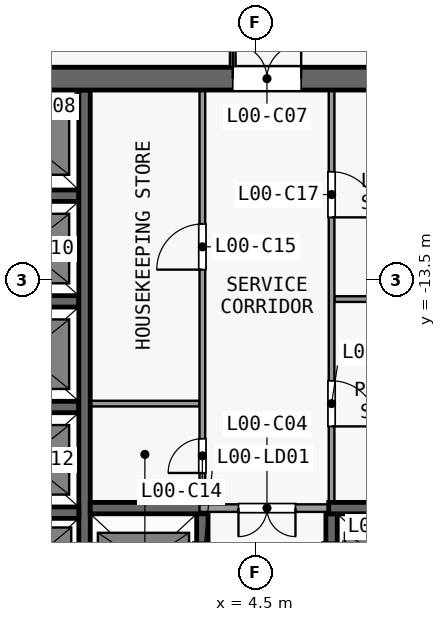
"""IFC4 building model, lengths in metres.
Left out: names, types, materials, properties, quantities, classifications, styles, units other than length and angle.
Written with IfcOpenShell. Run it as: python <this file> out.ifc"""

import sys

from ifc_helpers import new_model, si_unit, direction, frame, frame_2d, origin, place, context, subcontext, project, spatial, rectangle, extrude, element, fill, save


model = new_model("IFC4")
c1 = context("Model", 3, precision=1e-05, world=origin(), true_north=direction((0.0, 1.0)))
c2 = subcontext(c1, "Body", "Model", "MODEL_VIEW")
j1 = project(units=[si_unit("LENGTHUNIT", "METRE"), si_unit("PLANEANGLEUNIT", "RADIAN")], contexts=[c1])
p1 = place(None, origin())
s1 = spatial("IfcSite", under=j1, at=p1, CompositionType="ELEMENT")
p2 = place(p1, origin())
s2 = spatial("IfcBuilding", under=s1, at=p2, CompositionType="ELEMENT")
p3 = place(p2, origin())
s3 = spatial("IfcBuildingStorey", under=s2, at=p3, CompositionType="ELEMENT", Elevation=0.0)
p4 = place(p3, frame((-13.5, -8.2, 0.0), z_axis=(0.0, 0.0, 1.0), x_axis=(1.0, 0.0, 0.0)))
e1 = element("IfcWall", 1, at=p4, inside=s3, PredefinedType="SHEAR", context=c2, shape_type="SweptSolid", body=[
    extrude(rectangle(XDim=27.0, YDim=0.6, at=frame_2d((13.5, 0.0))), origin(), (0.0, 0.0, 1.0), 7.65),
])
p5 = place(p4, frame((7.8, 0.0, 0.0)))
e2 = element("IfcOpeningElement", 2, at=p5, cuts=e1, PredefinedType="OPENING", context=c2, shape_type="SweptSolid", body=[
    extrude(rectangle(XDim=1.8, YDim=2.1, at=frame_2d((0.9, 1.05))), frame((0.0, 0.31, 0.0), z_axis=(0.0, -1.0, 0.0), x_axis=(1.0, 0.0, 0.0)), (0.0, 0.0, 1.0), 0.62),
])
p6 = place(p4, frame((17.4, 0.0, 0.0)))
e3 = element("IfcOpeningElement", 3, at=p6, cuts=e1, PredefinedType="OPENING", context=c2, shape_type="SweptSolid", body=[
    extrude(rectangle(XDim=1.8, YDim=2.1, at=frame_2d((0.9, 1.05))), frame((0.0, 0.31, 0.0), z_axis=(0.0, -1.0, 0.0), x_axis=(1.0, 0.0, 0.0)), (0.0, 0.0, 1.0), 0.62),
])
p7 = place(p4, frame((2.725, 0.0, 0.0)))
e4 = element("IfcOpeningElement", 4, at=p7, cuts=e1, PredefinedType="OPENING", context=c2, shape_type="SweptSolid", body=[
    extrude(rectangle(XDim=0.9, YDim=2.1, at=frame_2d((0.45, 1.05))), frame((0.0, 0.31, 0.0), z_axis=(0.0, -1.0, 0.0), x_axis=(1.0, 0.0, 0.0)), (0.0, 0.0, 1.0), 0.62),
])
p8 = place(p4, frame((24.075, 0.0, 0.0)))
e5 = element("IfcOpeningElement", 5, at=p8, cuts=e1, PredefinedType="OPENING", context=c2, shape_type="SweptSolid", body=[
    extrude(rectangle(XDim=1.2, YDim=2.1, at=frame_2d((0.6, 1.05))), frame((0.0, 0.31, 0.0), z_axis=(0.0, -1.0, 0.0), x_axis=(1.0, 0.0, 0.0)), (0.0, 0.0, 1.0), 0.62),
])
p9 = place(p3, frame((-2.95, -19.62, 0.0), z_axis=(0.0, 0.0, 1.0), x_axis=(1.0, 0.0, 0.0)))
e6 = element("IfcWall", 6, at=p9, inside=s3, PredefinedType="SHEAR", context=c2, shape_type="SweptSolid", body=[
    extrude(rectangle(XDim=2.8, YDim=0.3, at=frame_2d((1.4, 0.0))), origin(), (0.0, 0.0, 1.0), 7.65),
])
p10 = place(p3, frame((0.15, -19.5, 0.0), z_axis=(0.0, 0.0, 1.0), x_axis=(1.0, 0.0, 0.0)))
e7 = element("IfcWall", 7, at=p10, inside=s3, PredefinedType="SHEAR", context=c2, shape_type="SweptSolid", body=[
    extrude(rectangle(XDim=3.025, YDim=0.3, at=frame_2d((1.513, 0.0))), origin(), (0.0, 0.0, 1.0), 7.65),
])
p11 = place(p3, frame((6.575, -19.5, 0.0), z_axis=(0.0, 0.0, 1.0), x_axis=(-1.0, 0.0, 0.0)))
e8 = element("IfcWall", 8, at=p11, inside=s3, PredefinedType="PARTITIONING", context=c2, shape_type="SweptSolid", body=[
    extrude(rectangle(XDim=3.55, YDim=0.2, at=frame_2d((1.775, 0.0))), origin(), (0.0, 0.0, 1.0), 7.65),
])
p12 = place(p11, frame((1.025, 0.0, 0.0)))
e9 = element("IfcOpeningElement", 9, at=p12, cuts=e8, PredefinedType="OPENING", context=c2, shape_type="SweptSolid", body=[
    extrude(rectangle(XDim=1.5, YDim=2.1, at=frame_2d((0.75, 1.05))), frame((0.0, 0.11, 0.0), z_axis=(0.0, -1.0, 0.0), x_axis=(1.0, 0.0, 0.0)), (0.0, 0.0, 1.0), 0.22),
])
p13 = place(p3, frame((6.425, -19.5, 0.0), z_axis=(0.0, 0.0, 1.0), x_axis=(1.0, 0.0, 0.0)))
e10 = element("IfcWall", 10, at=p13, inside=s3, PredefinedType="SHEAR", context=c2, shape_type="SweptSolid", body=[
    extrude(rectangle(XDim=3.025, YDim=0.3, at=frame_2d((1.512, 0.0))), origin(), (0.0, 0.0, 1.0), 7.65),
])
p14 = place(p3, frame((-2.95, -16.84, 0.0), z_axis=(0.0, 0.0, 1.0), x_axis=(1.0, 0.0, 0.0)))
e11 = element("IfcWall", 11, at=p14, inside=s3, PredefinedType="SHEAR", context=c2, shape_type="SweptSolid", body=[
    extrude(rectangle(XDim=2.8, YDim=0.3, at=frame_2d((1.4, 0.0))), origin(), (0.0, 0.0, 1.0), 7.65),
])
p15 = place(p3, frame((0.15, -16.75, 0.0), z_axis=(0.0, 0.0, 1.0), x_axis=(1.0, 0.0, 0.0)))
e12 = element("IfcWall", 12, at=p15, inside=s3, PredefinedType="PARTITIONING", context=c2, shape_type="SweptSolid", body=[
    extrude(rectangle(XDim=2.875, YDim=0.15, at=frame_2d((1.438, 0.0))), origin(), (0.0, 0.0, 1.0), 7.65),
])
p16 = place(p3, frame((-2.95, -14.06, 0.0), z_axis=(0.0, 0.0, 1.0), x_axis=(1.0, 0.0, 0.0)))
e13 = element("IfcWall", 13, at=p16, inside=s3, PredefinedType="SHEAR", context=c2, shape_type="SweptSolid", body=[
    extrude(rectangle(XDim=2.8, YDim=0.3, at=frame_2d((1.4, 0.0))), origin(), (0.0, 0.0, 1.0), 7.65),
])
p17 = place(p3, frame((6.575, -14.0, 0.0), z_axis=(0.0, 0.0, 1.0), x_axis=(1.0, 0.0, 0.0)))
e14 = element("IfcWall", 14, at=p17, inside=s3, PredefinedType="PARTITIONING", context=c2, shape_type="SweptSolid", body=[
    extrude(rectangle(XDim=2.925, YDim=0.15, at=frame_2d((1.462, 0.0))), origin(), (0.0, 0.0, 1.0), 7.65),
])
p18 = place(p3, frame((-2.95, -11.28, 0.0), z_axis=(0.0, 0.0, 1.0), x_axis=(1.0, 0.0, 0.0)))
e15 = element("IfcWall", 15, at=p18, inside=s3, PredefinedType="SHEAR", context=c2, shape_type="SweptSolid", body=[
    extrude(rectangle(XDim=2.8, YDim=0.3, at=frame_2d((1.4, 0.0))), origin(), (0.0, 0.0, 1.0), 7.65),
])
p19 = place(p3, frame((0.0, -22.25, 0.0), z_axis=(0.0, 0.0, 1.0), x_axis=(0.0, 1.0, 0.0)))
e16 = element("IfcWall", 16, at=p19, inside=s3, PredefinedType="SHEAR", context=c2, shape_type="SweptSolid", body=[
    extrude(rectangle(XDim=13.75, YDim=0.3, at=frame_2d((6.875, 0.0))), origin(), (0.0, 0.0, 1.0), 7.65),
])
p20 = place(p3, frame((3.1, -22.25, 0.0), z_axis=(0.0, 0.0, 1.0), x_axis=(0.0, 1.0, 0.0)))
e17 = element("IfcWall", 17, at=p20, inside=s3, PredefinedType="SHEAR", context=c2, shape_type="SweptSolid", body=[
    extrude(rectangle(XDim=2.85, YDim=0.3, at=frame_2d((1.425, 0.0))), origin(), (0.0, 0.0, 1.0), 7.65),
])
p21 = place(p20, frame((0.75, 0.0, 0.0)))
e18 = element("IfcOpeningElement", 18, at=p21, cuts=e17, PredefinedType="OPENING", context=c2, shape_type="SweptSolid", body=[
    extrude(rectangle(XDim=1.1, YDim=2.1, at=frame_2d((0.55, 1.05))), frame((0.0, 0.16, 0.0), z_axis=(0.0, -1.0, 0.0), x_axis=(1.0, 0.0, 0.0)), (0.0, 0.0, 1.0), 0.32),
])
p22 = place(p3, frame((3.1, -19.4, 0.0), z_axis=(0.0, 0.0, 1.0), x_axis=(0.0, 1.0, 0.0)))
e19 = element("IfcWall", 19, at=p22, inside=s3, PredefinedType="PARTITIONING", context=c2, shape_type="SweptSolid", body=[
    extrude(rectangle(XDim=10.9, YDim=0.15, at=frame_2d((5.45, 0.0))), origin(), (0.0, 0.0, 1.0), 7.65),
])
p23 = place(p22, frame((0.825, 0.0, 0.0)))
e20 = element("IfcOpeningElement", 20, at=p23, cuts=e19, PredefinedType="OPENING", context=c2, shape_type="SweptSolid", body=[
    extrude(rectangle(XDim=0.9, YDim=2.1, at=frame_2d((0.45, 1.05))), frame((0.0, 0.085, 0.0), z_axis=(0.0, -1.0, 0.0), x_axis=(1.0, 0.0, 0.0)), (0.0, 0.0, 1.0), 0.17),
])
p24 = place(p22, frame((6.175, 0.0, 0.0)))
e21 = element("IfcOpeningElement", 21, at=p24, cuts=e19, PredefinedType="OPENING", context=c2, shape_type="SweptSolid", body=[
    extrude(rectangle(XDim=1.2, YDim=2.1, at=frame_2d((0.6, 1.05))), frame((0.0, 0.085, 0.0), z_axis=(0.0, -1.0, 0.0), x_axis=(1.0, 0.0, 0.0)), (0.0, 0.0, 1.0), 0.17),
])
p25 = place(p3, frame((6.5, -22.25, 0.0), z_axis=(0.0, 0.0, 1.0), x_axis=(0.0, 1.0, 0.0)))
e22 = element("IfcWall", 22, at=p25, inside=s3, PredefinedType="SHEAR", context=c2, shape_type="SweptSolid", body=[
    extrude(rectangle(XDim=2.6, YDim=0.3, at=frame_2d((1.3, 0.0))), origin(), (0.0, 0.0, 1.0), 7.65),
])
p26 = place(p25, frame((0.75, 0.0, 0.0)))
e23 = element("IfcOpeningElement", 23, at=p26, cuts=e22, PredefinedType="OPENING", context=c2, shape_type="SweptSolid", body=[
    extrude(rectangle(XDim=1.1, YDim=2.1, at=frame_2d((0.55, 1.05))), frame((0.0, 0.16, 0.0), z_axis=(0.0, -1.0, 0.0), x_axis=(1.0, 0.0, 0.0)), (0.0, 0.0, 1.0), 0.32),
])
p27 = place(p3, frame((6.5, -8.5, 0.0), z_axis=(0.0, 0.0, 1.0), x_axis=(0.0, -1.0, 0.0)))
e24 = element("IfcWall", 24, at=p27, inside=s3, PredefinedType="PARTITIONING", context=c2, shape_type="SweptSolid", body=[
    extrude(rectangle(XDim=10.85, YDim=0.15, at=frame_2d((5.425, 0.0))), origin(), (0.0, 0.0, 1.0), 7.65),
])
p28 = place(p27, frame((7.65, 0.0, 0.0)))
e25 = element("IfcOpeningElement", 25, at=p28, cuts=e24, PredefinedType="OPENING", context=c2, shape_type="SweptSolid", body=[
    extrude(rectangle(XDim=1.2, YDim=2.1, at=frame_2d((0.6, 1.05))), frame((0.0, 0.085, 0.0), z_axis=(0.0, -1.0, 0.0), x_axis=(1.0, 0.0, 0.0)), (0.0, 0.0, 1.0), 0.17),
])
p29 = place(p27, frame((2.15, 0.0, 0.0)))
e26 = element("IfcOpeningElement", 26, at=p29, cuts=e24, PredefinedType="OPENING", context=c2, shape_type="SweptSolid", body=[
    extrude(rectangle(XDim=1.2, YDim=2.1, at=frame_2d((0.6, 1.05))), frame((0.0, 0.085, 0.0), z_axis=(0.0, -1.0, 0.0), x_axis=(1.0, 0.0, 0.0)), (0.0, 0.0, 1.0), 0.17),
])
p30 = place(p3, frame((3.9, -7.9, 0.0), z_axis=(0.0, 0.0, 1.0), x_axis=(0.0, 1.0, 0.0)))
e27 = element("IfcWall", 27, at=p30, inside=s3, PredefinedType="PARTITIONING", context=c2, shape_type="SweptSolid", body=[
    extrude(rectangle(XDim=2.225, YDim=0.15, at=frame_2d((1.112, 0.0))), origin(), (0.0, 0.0, 1.0), 7.65),
])
p31 = place(p12, origin())
e28 = element("IfcDoor", 28, at=p31, inside=s3, OperationType="DOUBLE_DOOR_SINGLE_SWING", PredefinedType="DOOR", context=c2, shape_type="SweptSolid", body=[
    extrude(rectangle(XDim=1.5, YDim=2.1, at=frame_2d((0.75, 1.05))), frame((0.0, 0.025, 0.0), z_axis=(0.0, -1.0, 0.0), x_axis=(1.0, 0.0, 0.0)), (0.0, 0.0, 1.0), 0.05),
])
fill(e9, e28)
p32 = place(p6, origin())
e29 = element("IfcDoor", 29, at=p32, inside=s3, OperationType="DOUBLE_DOOR_SINGLE_SWING", PredefinedType="DOOR", context=c2, shape_type="SweptSolid", body=[
    extrude(rectangle(XDim=1.8, YDim=2.1, at=frame_2d((0.9, 1.05))), frame((0.0, 0.025, 0.0), z_axis=(0.0, -1.0, 0.0), x_axis=(1.0, 0.0, 0.0)), (0.0, 0.0, 1.0), 0.05),
])
fill(e3, e29)
p33 = place(p23, origin())
e30 = element("IfcDoor", 30, at=p33, inside=s3, OperationType="SINGLE_SWING_LEFT", PredefinedType="DOOR", context=c2, shape_type="SweptSolid", body=[
    extrude(rectangle(XDim=0.9, YDim=2.1, at=frame_2d((0.45, 1.05))), frame((0.0, 0.025, 0.0), z_axis=(0.0, -1.0, 0.0), x_axis=(1.0, 0.0, 0.0)), (0.0, 0.0, 1.0), 0.05),
])
fill(e20, e30)
p34 = place(p24, origin())
e31 = element("IfcDoor", 31, at=p34, inside=s3, OperationType="SINGLE_SWING_LEFT", PredefinedType="DOOR", context=c2, shape_type="SweptSolid", body=[
    extrude(rectangle(XDim=1.2, YDim=2.1, at=frame_2d((0.6, 1.05))), frame((0.0, 0.025, 0.0), z_axis=(0.0, -1.0, 0.0), x_axis=(1.0, 0.0, 0.0)), (0.0, 0.0, 1.0), 0.05),
])
fill(e21, e31)
p35 = place(p28, origin())
e32 = element("IfcDoor", 32, at=p35, inside=s3, OperationType="SINGLE_SWING_RIGHT", PredefinedType="DOOR", context=c2, shape_type="SweptSolid", body=[
    extrude(rectangle(XDim=1.2, YDim=2.1, at=frame_2d((0.6, 1.05))), frame((0.0, 0.025, 0.0), z_axis=(0.0, -1.0, 0.0), x_axis=(1.0, 0.0, 0.0)), (0.0, 0.0, 1.0), 0.05),
])
fill(e25, e32)
p36 = place(p29, origin())
e33 = element("IfcDoor", 33, at=p36, inside=s3, OperationType="SINGLE_SWING_RIGHT", PredefinedType="DOOR", context=c2, shape_type="SweptSolid", body=[
    extrude(rectangle(XDim=1.2, YDim=2.1, at=frame_2d((0.6, 1.05))), frame((0.0, 0.025, 0.0), z_axis=(0.0, -1.0, 0.0), x_axis=(1.0, 0.0, 0.0)), (0.0, 0.0, 1.0), 0.05),
])
fill(e26, e33)
save(model, sys.argv[1])
